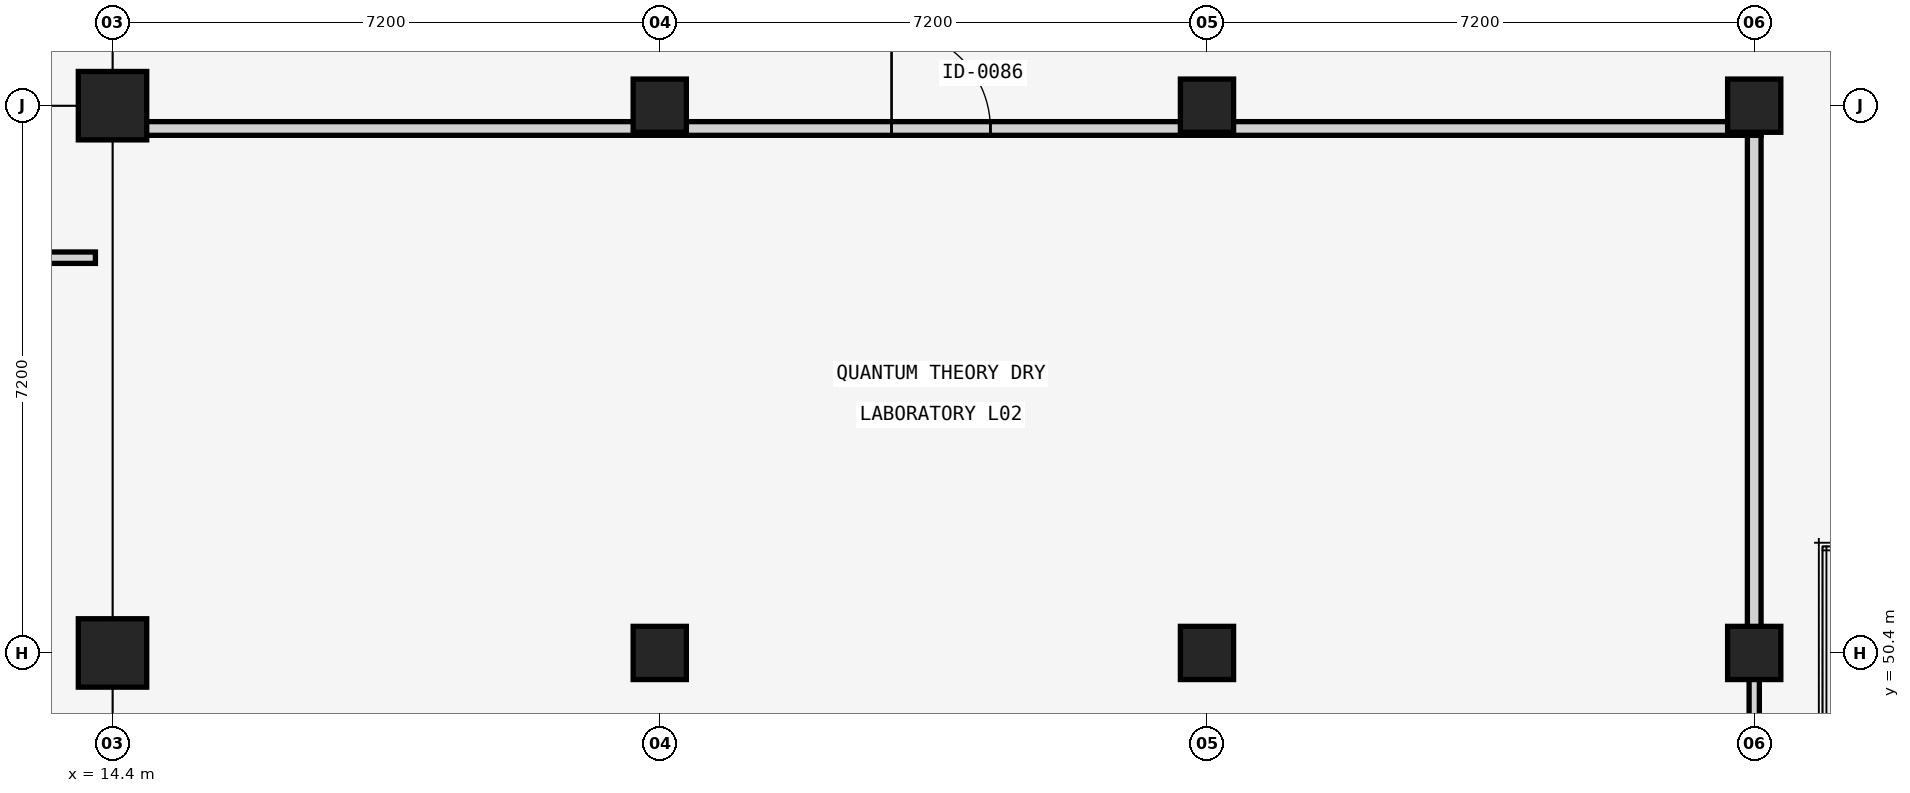
"""IFC4 building model, lengths in metres.
Left out: names, types, materials, properties, quantities, classifications, styles, units other than length and angle.
Written with IfcOpenShell. Run it as: python <this file> out.ifc"""

import sys

from ifc_helpers import new_model, si_unit, direction, frame, frame_2d, origin, origin_2d, place, context, subcontext, project, spatial, rectangle, extrude, element, fill, save


model = new_model("IFC4")
c1 = context("Model", 3, precision=1e-05, world=origin(), true_north=direction((0.0, 1.0)))
c2 = subcontext(c1, "Body", "Model", "MODEL_VIEW")
j1 = project(units=[si_unit("LENGTHUNIT", "METRE"), si_unit("PLANEANGLEUNIT", "RADIAN")], contexts=[c1])
p1 = place(None, origin())
s1 = spatial("IfcSite", under=j1, at=p1, CompositionType="ELEMENT")
p2 = place(p1, origin())
s2 = spatial("IfcBuilding", under=s1, at=p2, CompositionType="ELEMENT")
p3 = place(p2, frame((0.0, 0.0, 8.96)))
s3 = spatial("IfcBuildingStorey", under=s2, at=p3, CompositionType="ELEMENT", Elevation=8.96)
for number, where, z_axis, x_axis in (
    (1, (14.4, 50.4, 0.0), (0.0, 0.0, 1.0), (1.0, 0.0, 0.0)),
    (2, (14.4, 57.6, 0.0), (0.0, 0.0, 1.0), (1.0, 0.0, 0.0)),
):
    element("IfcColumn", number, at=place(p3, frame(where, z_axis=z_axis, x_axis=x_axis)), inside=s3, PredefinedType="COLUMN", context=c2, shape_type="SweptSolid", body=[
        extrude(rectangle(XDim=0.9, YDim=0.9, at=origin_2d()), origin(), (0.0, 0.0, 1.0), 4.16),
    ])
for number, where, z_axis, x_axis in (
    (3, (21.6, 50.4, 0.0), (0.0, 0.0, 1.0), (1.0, 0.0, 0.0)),
    (4, (21.6, 57.6, 0.0), (0.0, 0.0, 1.0), (1.0, 0.0, 0.0)),
    (5, (28.8, 50.4, 0.0), (0.0, 0.0, 1.0), (1.0, 0.0, 0.0)),
    (6, (28.8, 57.6, 0.0), (0.0, 0.0, 1.0), (1.0, 0.0, 0.0)),
    (7, (36.0, 50.4, 0.0), (0.0, 0.0, 1.0), (1.0, 0.0, 0.0)),
    (8, (36.0, 57.6, 0.0), (0.0, 0.0, 1.0), (1.0, 0.0, 0.0)),
):
    element("IfcColumn", number, at=place(p3, frame(where, z_axis=z_axis, x_axis=x_axis)), inside=s3, PredefinedType="COLUMN", context=c2, shape_type="SweptSolid", body=[
        extrude(rectangle(XDim=0.7, YDim=0.7, at=origin_2d()), origin(), (0.0, 0.0, 1.0), 4.16),
    ])
p4 = place(p3, frame((10.025, 55.6, 0.0), z_axis=(0.0, 0.0, 1.0), x_axis=(1.0, 0.0, 0.0)))
e9 = element("IfcWall", 9, at=p4, inside=s3, PredefinedType="PARTITIONING", context=c2, shape_type="SweptSolid", body=[
    extrude(rectangle(XDim=4.15, YDim=0.15, at=frame_2d((2.075, 0.0))), origin(), (0.0, 0.0, 1.0), 2.81),
])
p5 = place(p3, frame((36.0, 36.367, 0.0), z_axis=(0.0, 0.0, 1.0), x_axis=(0.0, 1.0, 0.0)))
e10 = element("IfcWall", 10, at=p5, inside=s3, PredefinedType="PARTITIONING", context=c2, shape_type="SweptSolid", body=[
    extrude(rectangle(XDim=13.965, YDim=0.135, at=frame_2d((6.982, 0.0))), origin(), (0.0, 0.0, 1.0), 3.26),
])
p6 = place(p5, frame((4.313, 0.0, 0.0)))
e11 = element("IfcOpeningElement", 11, at=p6, cuts=e10, PredefinedType="OPENING", context=c2, shape_type="SweptSolid", body=[
    extrude(rectangle(XDim=1.15, YDim=2.15, at=frame_2d((0.575, 1.075))), frame((0.0, 0.078, 0.0), z_axis=(0.0, -1.0, 0.0), x_axis=(1.0, 0.0, 0.0)), (0.0, 0.0, 1.0), 0.155),
])
p7 = place(p3, frame((14.51, 57.3, 0.0), z_axis=(0.0, 0.0, 1.0), x_axis=(1.0, 0.0, 0.0)))
e12 = element("IfcWall", 12, at=p7, inside=s3, PredefinedType="PARTITIONING", context=c2, shape_type="SweptSolid", body=[
    extrude(rectangle(XDim=21.58, YDim=0.18, at=frame_2d((10.79, 0.0))), origin(), (0.0, 0.0, 1.0), 2.81),
])
p8 = place(p7, frame((10.14, 0.0, 0.0)))
e13 = element("IfcOpeningElement", 13, at=p8, cuts=e12, PredefinedType="OPENING", context=c2, shape_type="SweptSolid", body=[
    extrude(rectangle(XDim=1.3, YDim=2.15, at=frame_2d((0.65, 1.075))), frame((0.0, 0.1, 0.0), z_axis=(0.0, -1.0, 0.0), x_axis=(1.0, 0.0, 0.0)), (0.0, 0.0, 1.0), 0.2),
])
p9 = place(p3, frame((36.0, 50.69, 0.0), z_axis=(0.0, 0.0, 1.0), x_axis=(0.0, 1.0, 0.0)))
e14 = element("IfcWall", 14, at=p9, inside=s3, PredefinedType="PARTITIONING", context=c2, shape_type="SweptSolid", body=[
    extrude(rectangle(XDim=6.52, YDim=0.18, at=frame_2d((3.26, 0.0))), origin(), (0.0, 0.0, 1.0), 3.26),
])
p10 = place(p8, origin())
e15 = element("IfcDoor", 15, at=p10, inside=s3, OperationType="SINGLE_SWING_LEFT", PredefinedType="DOOR", context=c2, shape_type="SweptSolid", body=[
    extrude(rectangle(XDim=1.3, YDim=2.15, at=frame_2d((0.65, 1.075))), frame((0.0, 0.025, 0.0), z_axis=(0.0, -1.0, 0.0), x_axis=(1.0, 0.0, 0.0)), (0.0, 0.0, 1.0), 0.05),
])
fill(e13, e15)
save(model, sys.argv[1])
